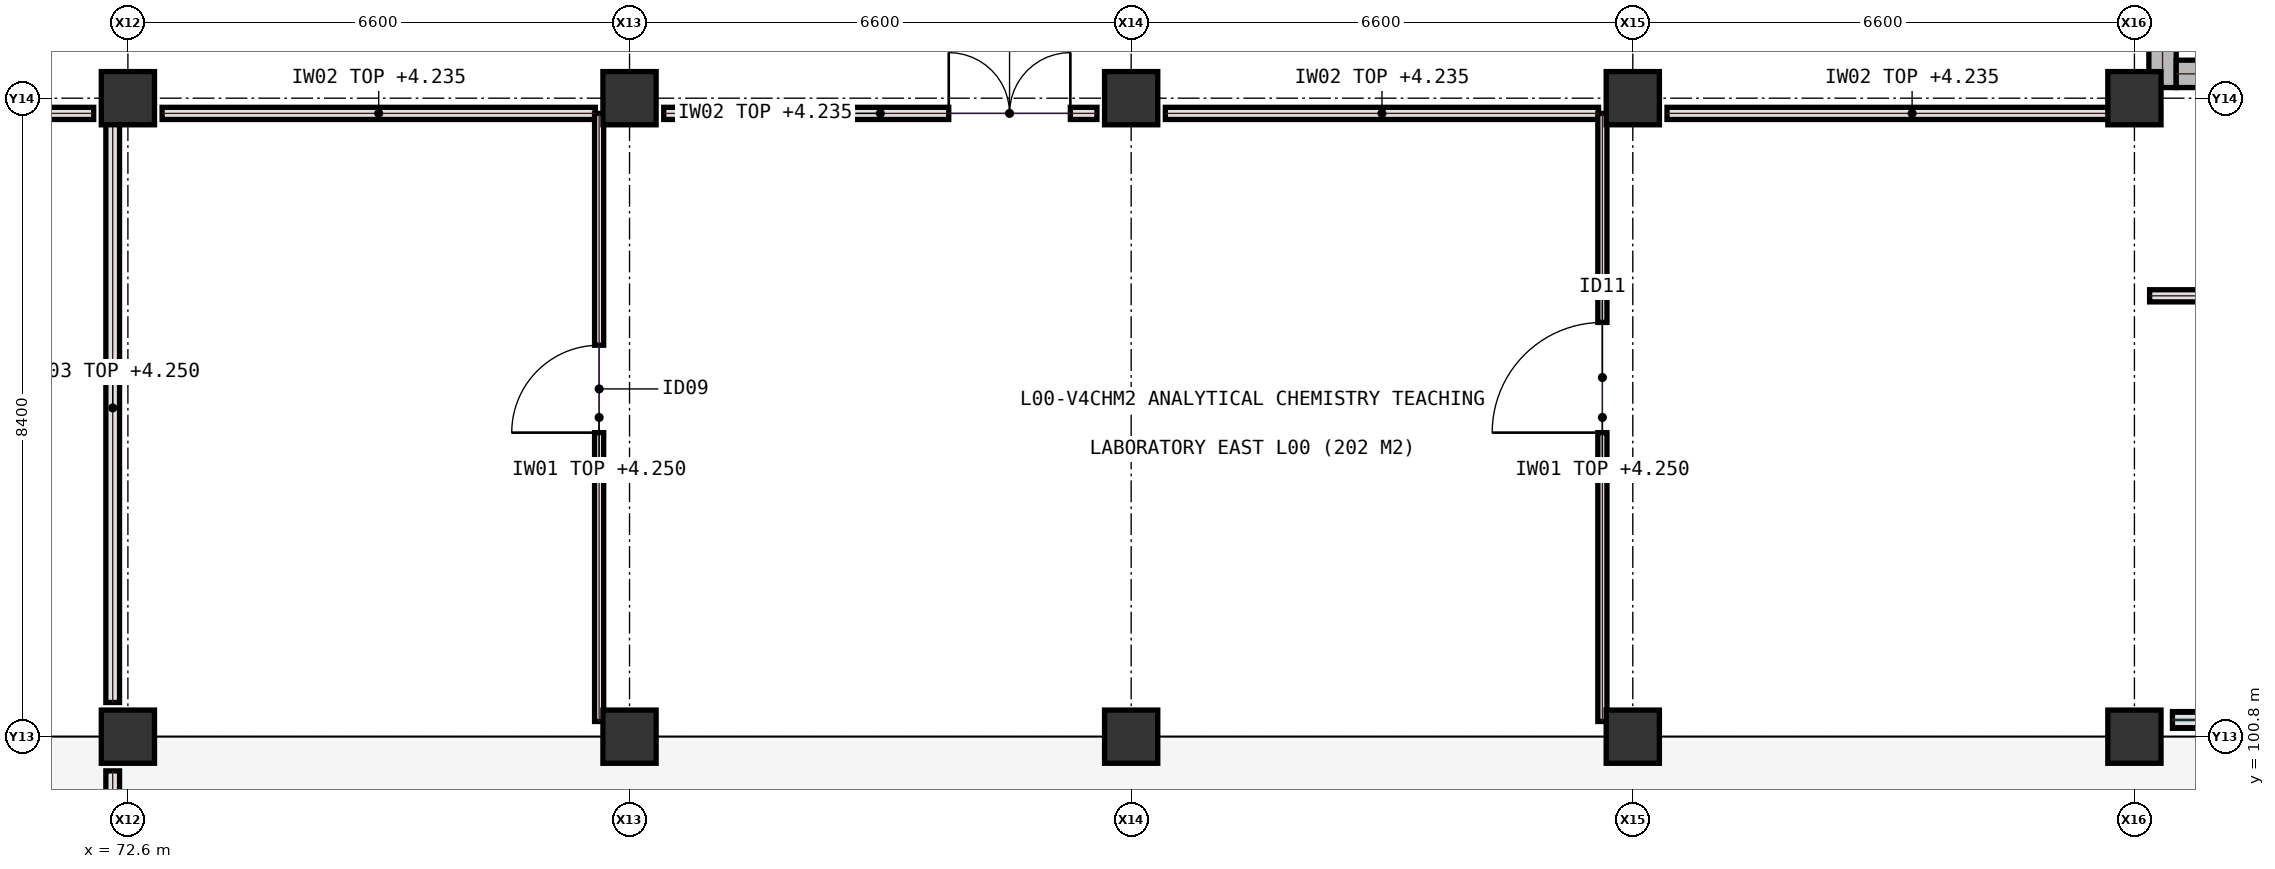
"""IFC4 building model, lengths in metres.
Left out: names, types, materials, properties, quantities, classifications, styles, units other than length and angle.
Written with IfcOpenShell. Run it as: python <this file> out.ifc"""

import sys

from ifc_helpers import new_model, si_unit, direction, frame, frame_2d, origin, origin_2d, place, context, subcontext, project, spatial, rectangle, extrude, element, fill, save


model = new_model("IFC4")
c1 = context("Model", 3, precision=1e-05, world=origin(), true_north=direction((0.0, 1.0)))
c2 = subcontext(c1, "Body", "Model", "MODEL_VIEW")
j1 = project(units=[si_unit("LENGTHUNIT", "METRE"), si_unit("PLANEANGLEUNIT", "RADIAN")], contexts=[c1])
p1 = place(None, origin())
s1 = spatial("IfcSite", under=j1, at=p1, CompositionType="ELEMENT")
p2 = place(p1, origin())
s2 = spatial("IfcBuilding", under=s1, at=p2, CompositionType="ELEMENT")
p3 = place(p2, origin())
s3 = spatial("IfcBuildingStorey", under=s2, at=p3, CompositionType="ELEMENT", Elevation=0.0)
for number, where, z_axis, x_axis in (
    (1, (72.6, 100.8, 0.0), (0.0, 0.0, 1.0), (1.0, 0.0, 0.0)),
    (2, (72.6, 109.2, 0.0), (0.0, 0.0, 1.0), (1.0, 0.0, 0.0)),
    (3, (79.2, 100.8, 0.0), (0.0, 0.0, 1.0), (1.0, 0.0, 0.0)),
    (4, (79.2, 109.2, 0.0), (0.0, 0.0, 1.0), (1.0, 0.0, 0.0)),
    (5, (85.8, 100.8, 0.0), (0.0, 0.0, 1.0), (1.0, 0.0, 0.0)),
    (6, (85.8, 109.2, 0.0), (0.0, 0.0, 1.0), (1.0, 0.0, 0.0)),
    (7, (92.4, 100.8, 0.0), (0.0, 0.0, 1.0), (1.0, 0.0, 0.0)),
    (8, (92.4, 109.2, 0.0), (0.0, 0.0, 1.0), (1.0, 0.0, 0.0)),
    (9, (99.0, 100.8, 0.0), (0.0, 0.0, 1.0), (1.0, 0.0, 0.0)),
    (10, (99.0, 109.2, 0.0), (0.0, 0.0, 1.0), (1.0, 0.0, 0.0)),
):
    element("IfcColumn", number, at=place(p3, frame(where, z_axis=z_axis, x_axis=x_axis)), inside=s3, PredefinedType="COLUMN", context=c2, shape_type="SweptSolid", body=[
        extrude(rectangle(XDim=0.7, YDim=0.7, at=origin_2d()), origin(), (0.0, 0.0, 1.0), 5.4),
    ])
for number, where, z_axis, x_axis in (
    (11, (66.45, 109.0, 0.0), (0.0, 0.0, 1.0), (1.0, 0.0, 0.0)),
    (12, (73.05, 109.0, 0.0), (0.0, 0.0, 1.0), (1.0, 0.0, 0.0)),
):
    element("IfcWall", number, at=place(p3, frame(where, z_axis=z_axis, x_axis=x_axis)), inside=s3, PredefinedType="PARTITIONING", context=c2, shape_type="SweptSolid", body=[
        extrude(rectangle(XDim=5.7, YDim=0.16, at=frame_2d((2.85, 0.0))), origin(), (0.0, 0.0, 1.0), 4.235),
    ])
p4 = place(p3, frame((79.65, 109.0, 0.0), z_axis=(0.0, 0.0, 1.0), x_axis=(1.0, 0.0, 0.0)))
e13 = element("IfcWall", 13, at=p4, inside=s3, PredefinedType="PARTITIONING", context=c2, shape_type="SweptSolid", body=[
    extrude(rectangle(XDim=5.7, YDim=0.16, at=frame_2d((2.85, 0.0))), origin(), (0.0, 0.0, 1.0), 4.235),
])
p5 = place(p4, frame((3.75, 0.0, 0.0)))
e14 = element("IfcOpeningElement", 14, at=p5, cuts=e13, PredefinedType="OPENING", context=c2, shape_type="SweptSolid", body=[
    extrude(rectangle(XDim=1.6, YDim=2.2, at=frame_2d((0.8, 1.1))), frame((0.0, 0.09, 0.0), z_axis=(0.0, -1.0, 0.0), x_axis=(1.0, 0.0, 0.0)), (0.0, 0.0, 1.0), 0.18),
])
p6 = place(p3, frame((86.25, 109.0, 0.0), z_axis=(0.0, 0.0, 1.0), x_axis=(1.0, 0.0, 0.0)))
e15 = element("IfcWall", 15, at=p6, inside=s3, PredefinedType="PARTITIONING", context=c2, shape_type="SweptSolid", body=[
    extrude(rectangle(XDim=5.7, YDim=0.16, at=frame_2d((2.85, 0.0))), origin(), (0.0, 0.0, 1.0), 4.235),
])
p7 = place(p3, frame((92.85, 109.0, 0.0), z_axis=(0.0, 0.0, 1.0), x_axis=(1.0, 0.0, 0.0)))
e16 = element("IfcWall", 16, at=p7, inside=s3, PredefinedType="PARTITIONING", context=c2, shape_type="SweptSolid", body=[
    extrude(rectangle(XDim=6.45, YDim=0.16, at=frame_2d((3.225, 0.0))), origin(), (0.0, 0.0, 1.0), 4.235),
])
p8 = place(p3, frame((72.4, 92.7, 0.0), z_axis=(0.0, 0.0, 1.0), x_axis=(0.0, 1.0, 0.0)))
e17 = element("IfcWall", 17, at=p8, inside=s3, PredefinedType="SOLIDWALL", context=c2, shape_type="SweptSolid", body=[
    extrude(rectangle(XDim=7.65, YDim=0.18, at=frame_2d((3.825, 0.0))), origin(), (0.0, 0.0, 1.0), 4.25),
])
p9 = place(p3, frame((72.4, 101.25, 0.0), z_axis=(0.0, 0.0, 1.0), x_axis=(0.0, 1.0, 0.0)))
e18 = element("IfcWall", 18, at=p9, inside=s3, PredefinedType="SOLIDWALL", context=c2, shape_type="SweptSolid", body=[
    extrude(rectangle(XDim=7.75, YDim=0.18, at=frame_2d((3.875, 0.0))), origin(), (0.0, 0.0, 1.0), 4.25),
])
p10 = place(p3, frame((78.8, 101.0, 0.0), z_axis=(0.0, 0.0, 1.0), x_axis=(0.0, 1.0, 0.0)))
e19 = element("IfcWall", 19, at=p10, inside=s3, PredefinedType="PARTITIONING", context=c2, shape_type="SweptSolid", body=[
    extrude(rectangle(XDim=8.0, YDim=0.12, at=frame_2d((4.0, 0.0))), origin(), (0.0, 0.0, 1.0), 4.25),
])
p11 = place(p10, frame((3.8, 0.0, 0.0)))
e20 = element("IfcOpeningElement", 20, at=p11, cuts=e19, PredefinedType="OPENING", context=c2, shape_type="SweptSolid", body=[
    extrude(rectangle(XDim=1.15, YDim=2.2, at=frame_2d((0.575, 1.1))), frame((0.0, 0.07, 0.0), z_axis=(0.0, -1.0, 0.0), x_axis=(1.0, 0.0, 0.0)), (0.0, 0.0, 1.0), 0.14),
])
p12 = place(p3, frame((92.0, 101.0, 0.0), z_axis=(0.0, 0.0, 1.0), x_axis=(0.0, 1.0, 0.0)))
e21 = element("IfcWall", 21, at=p12, inside=s3, PredefinedType="PARTITIONING", context=c2, shape_type="SweptSolid", body=[
    extrude(rectangle(XDim=8.0, YDim=0.12, at=frame_2d((4.0, 0.0))), origin(), (0.0, 0.0, 1.0), 4.25),
])
p13 = place(p12, frame((3.8, 0.0, 0.0)))
e22 = element("IfcOpeningElement", 22, at=p13, cuts=e21, PredefinedType="OPENING", context=c2, shape_type="SweptSolid", body=[
    extrude(rectangle(XDim=1.45, YDim=2.25, at=frame_2d((0.725, 1.125))), frame((0.0, 0.07, 0.0), z_axis=(0.0, -1.0, 0.0), x_axis=(1.0, 0.0, 0.0)), (0.0, 0.0, 1.0), 0.14),
])
p14 = place(p3, frame((99.2, 106.6, 0.0), z_axis=(0.0, 0.0, 1.0), x_axis=(1.0, 0.0, 0.0)))
e23 = element("IfcWall", 23, at=p14, inside=s3, PredefinedType="PARTITIONING", context=c2, shape_type="SweptSolid", body=[
    extrude(rectangle(XDim=12.9, YDim=0.16, at=frame_2d((6.45, 0.0))), origin(), (0.0, 0.0, 1.0), 4.25),
])
p15 = place(p14, frame((4.2, 0.0, 0.0)))
e24 = element("IfcOpeningElement", 24, at=p15, cuts=e23, PredefinedType="OPENING", context=c2, shape_type="SweptSolid", body=[
    extrude(rectangle(XDim=1.05, YDim=2.15, at=frame_2d((0.525, 1.075))), frame((0.0, 0.09, 0.0), z_axis=(0.0, -1.0, 0.0), x_axis=(1.0, 0.0, 0.0)), (0.0, 0.0, 1.0), 0.18),
])
p16 = place(p3, frame((99.5, 101.02, 0.0), z_axis=(0.0, 0.0, 1.0), x_axis=(1.0, 0.0, 0.0)))
e25 = element("IfcWall", 25, at=p16, inside=s3, PredefinedType="SOLIDWALL", context=c2, shape_type="SweptSolid", body=[
    extrude(rectangle(XDim=5.6, YDim=0.22, at=frame_2d((2.8, 0.0))), origin(), (0.0, 0.0, 1.0), 0.85),
])
p17 = place(p3, frame((99.37, 109.34, 0.0), z_axis=(0.0, 0.0, 1.0), x_axis=(0.0, 1.0, 0.0)))
e26 = element("IfcWall", 26, at=p17, inside=s3, PredefinedType="SHEAR", context=c2, shape_type="SweptSolid", body=[
    extrude(rectangle(XDim=8.09, YDim=0.36, at=frame_2d((4.045, 0.0))), origin(), (0.0, 0.0, 1.0), 5.1),
])
p18 = place(p3, frame((99.55, 109.52, 0.0), z_axis=(0.0, 0.0, 1.0), x_axis=(1.0, 0.0, 0.0)))
e27 = element("IfcWall", 27, at=p18, inside=s3, PredefinedType="SHEAR", context=c2, shape_type="SweptSolid", body=[
    extrude(rectangle(XDim=3.8, YDim=0.36, at=frame_2d((1.9, 0.0))), origin(), (0.0, 0.0, 1.0), 5.1),
])
p19 = place(p5, origin())
e28 = element("IfcDoor", 28, at=p19, inside=s3, OperationType="DOUBLE_DOOR_SINGLE_SWING", PredefinedType="DOOR", context=c2, shape_type="SweptSolid", body=[
    extrude(rectangle(XDim=1.6, YDim=2.2, at=frame_2d((0.8, 1.1))), frame((0.0, 0.025, 0.0), z_axis=(0.0, -1.0, 0.0), x_axis=(1.0, 0.0, 0.0)), (0.0, 0.0, 1.0), 0.05),
])
fill(e14, e28)
p20 = place(p11, origin())
e29 = element("IfcDoor", 29, at=p20, inside=s3, OperationType="SINGLE_SWING_LEFT", PredefinedType="DOOR", context=c2, shape_type="SweptSolid", body=[
    extrude(rectangle(XDim=1.15, YDim=2.2, at=frame_2d((0.575, 1.1))), frame((0.0, 0.025, 0.0), z_axis=(0.0, -1.0, 0.0), x_axis=(1.0, 0.0, 0.0)), (0.0, 0.0, 1.0), 0.05),
])
fill(e20, e29)
p21 = place(p13, origin())
e30 = element("IfcDoor", 30, at=p21, inside=s3, OperationType="SINGLE_SWING_LEFT", PredefinedType="DOOR", context=c2, shape_type="SweptSolid", body=[
    extrude(rectangle(XDim=1.45, YDim=2.25, at=frame_2d((0.725, 1.125))), frame((0.0, 0.025, 0.0), z_axis=(0.0, -1.0, 0.0), x_axis=(1.0, 0.0, 0.0)), (0.0, 0.0, 1.0), 0.05),
])
fill(e22, e30)
save(model, sys.argv[1])
